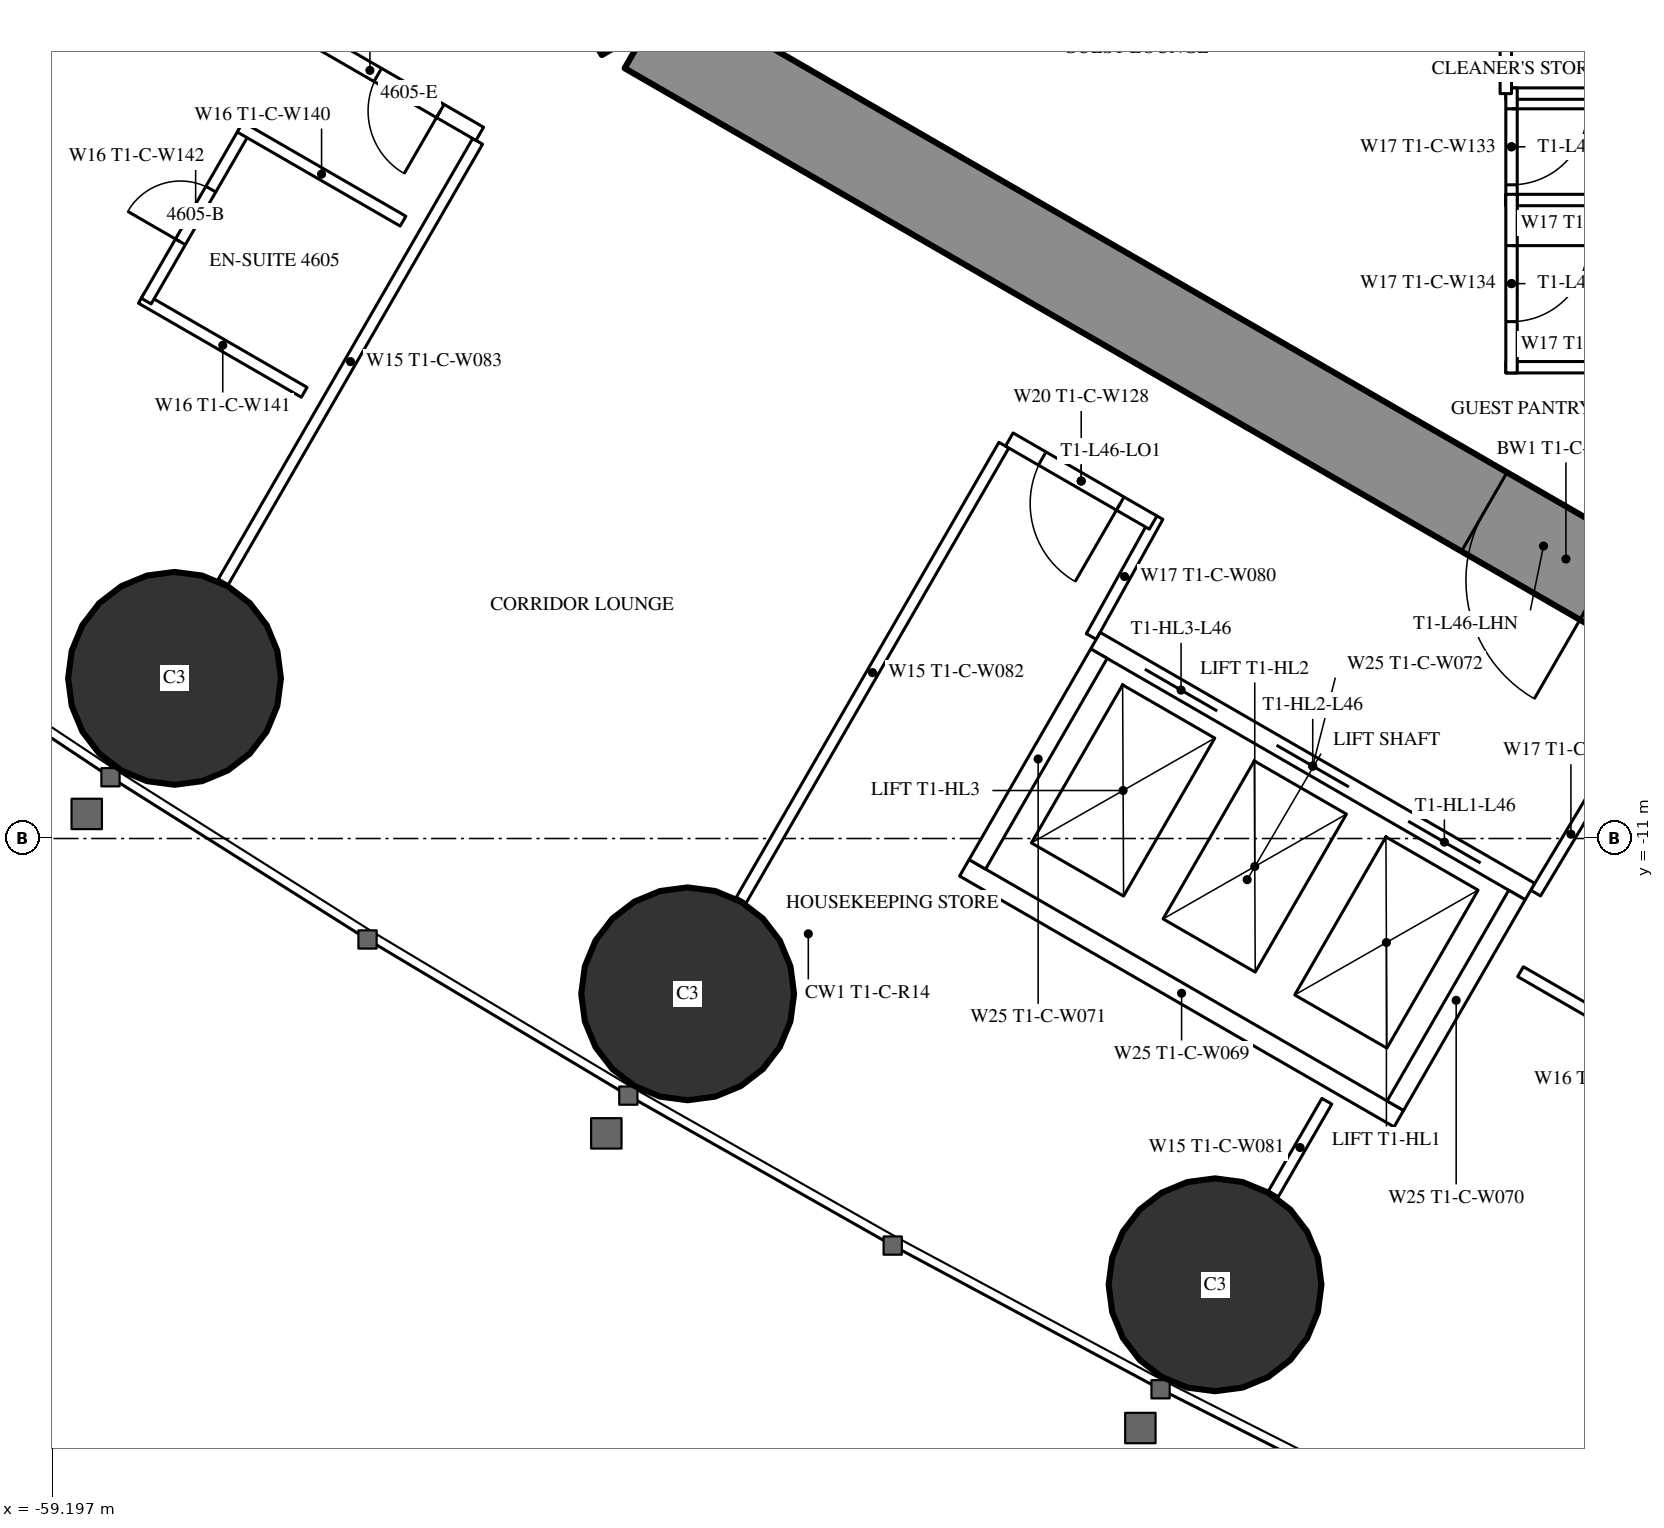
"""IFC4 building model, lengths in metres.
Left out: names, types, materials, properties, quantities, classifications, styles, units other than length and angle.
Written with IfcOpenShell. Run it as: python <this file> out.ifc"""

import sys

from ifc_helpers import new_model, si_unit, direction, frame, frame_2d, origin, origin_2d, place, context, subcontext, project, spatial, rectangle, circle, extrude, element, fill, save


model = new_model("IFC4")
c1 = context("Model", 3, precision=1e-05, world=origin(), true_north=direction((0.0, 1.0)))
c2 = subcontext(c1, "Body", "Model", "MODEL_VIEW")
j1 = project(units=[si_unit("LENGTHUNIT", "METRE"), si_unit("PLANEANGLEUNIT", "RADIAN")], contexts=[c1])
p1 = place(None, origin())
s1 = spatial("IfcSite", under=j1, at=p1, CompositionType="ELEMENT")
p2 = place(p1, origin())
s2 = spatial("IfcBuilding", under=s1, at=p2, CompositionType="ELEMENT")
p3 = place(p2, frame((0.0, 0.0, 173.8)))
s3 = spatial("IfcBuildingStorey", under=s2, at=p3, CompositionType="ELEMENT", Elevation=173.8)
for number, where, z_axis, x_axis in (
    (1, (-57.59, -8.893, 0.0), (0.0, 0.0, 1.0), (1.0, 0.0, 0.0)),
    (2, (-50.839, -13.043, 0.0), (0.0, 0.0, 1.0), (1.0, 0.0, 0.0)),
    (3, (-43.9, -16.871, 0.0), (0.0, 0.0, 1.0), (1.0, 0.0, 0.0)),
):
    element("IfcColumn", number, at=place(p3, frame(where, z_axis=z_axis, x_axis=x_axis)), inside=s3, PredefinedType="COLUMN", context=c2, shape_type="SweptSolid", body=[
        extrude(circle(Radius=1.4, at=origin_2d()), origin(), (0.0, 0.0, 1.0), 3.5),
    ])
p4 = place(p3, frame((-27.2, 14.3, 0.0), z_axis=(0.0, 0.0, 1.0), x_axis=(-0.866026593062, -0.499997940104, 0.0)))
e4 = element("IfcWall", 4, at=p4, inside=s3, PredefinedType="SHEAR", context=c2, shape_type="SweptSolid", body=[
    extrude(rectangle(XDim=28.946, YDim=1.2, at=frame_2d((14.473, 0.0))), origin(), (0.0, 0.0, 1.0), 3.5),
])
p5 = place(p4, frame((4.6, 0.0, 0.0)))
e5 = element("IfcOpeningElement", 5, at=p5, cuts=e4, PredefinedType="OPENING", context=c2, shape_type="SweptSolid", body=[
    extrude(rectangle(XDim=1.0, YDim=2.2, at=frame_2d((0.5, 1.1))), frame((0.0, 0.61, 0.0), z_axis=(0.0, -1.0, 0.0), x_axis=(1.0, 0.0, 0.0)), (0.0, 0.0, 1.0), 1.22),
])
p6 = place(p4, frame((13.395, 0.0, 0.0)))
e6 = element("IfcOpeningElement", 6, at=p6, cuts=e4, PredefinedType="OPENING", context=c2, shape_type="SweptSolid", body=[
    extrude(rectangle(XDim=1.8, YDim=2.2, at=frame_2d((0.9, 1.1))), frame((0.0, 0.61, 0.0), z_axis=(0.0, -1.0, 0.0), x_axis=(1.0, 0.0, 0.0)), (0.0, 0.0, 1.0), 1.22),
])
p7 = place(p3, frame((-27.2, -14.3, 0.0), z_axis=(0.0, 0.0, 1.0), x_axis=(-0.866024021859, 0.500002393557, 0.0)))
e7 = element("IfcWall", 7, at=p7, inside=s3, PredefinedType="SHEAR", context=c2, shape_type="SweptSolid", body=[
    extrude(rectangle(XDim=27.907, YDim=1.2, at=frame_2d((13.954, 0.0))), origin(), (0.0, 0.0, 1.0), 3.5),
])
p8 = place(p7, frame((4.6, 0.0, 0.0)))
e8 = element("IfcOpeningElement", 8, at=p8, cuts=e7, PredefinedType="OPENING", context=c2, shape_type="SweptSolid", body=[
    extrude(rectangle(XDim=1.0, YDim=2.2, at=frame_2d((0.5, 1.1))), frame((0.0, 0.61, 0.0), z_axis=(0.0, -1.0, 0.0), x_axis=(1.0, 0.0, 0.0)), (0.0, 0.0, 1.0), 1.22),
])
p9 = place(p7, frame((13.395, 0.0, 0.0)))
e9 = element("IfcOpeningElement", 9, at=p9, cuts=e7, PredefinedType="OPENING", context=c2, shape_type="SweptSolid", body=[
    extrude(rectangle(XDim=1.8, YDim=2.2, at=frame_2d((0.9, 1.1))), frame((0.0, 0.61, 0.0), z_axis=(0.0, -1.0, 0.0), x_axis=(1.0, 0.0, 0.0)), (0.0, 0.0, 1.0), 1.22),
])
p10 = place(p3, frame((-46.679, -5.825, 0.0), z_axis=(0.0, 0.0, 1.0), x_axis=(-0.500006839597, -0.866021454905, 0.0)))
e10 = element("IfcWall", 10, at=p10, inside=s3, PredefinedType="PARTITIONING", context=c2, shape_type="SweptSolid", body=[
    extrude(rectangle(XDim=6.911, YDim=0.15, at=frame_2d((3.456, 0.0))), origin(), (0.0, 0.0, 1.0), 2.3),
])
p11 = place(p3, frame((-53.602, -1.828, 0.0), z_axis=(0.0, 0.0, 1.0), x_axis=(-0.49999191814, -0.866030069798, 0.0)))
e11 = element("IfcWall", 11, at=p11, inside=s3, PredefinedType="PARTITIONING", context=c2, shape_type="SweptSolid", body=[
    extrude(rectangle(XDim=6.692, YDim=0.15, at=frame_2d((3.346, 0.0))), origin(), (0.0, 0.0, 1.0), 2.3),
])
p12 = place(p3, frame((-42.429, -14.457, 0.0), z_axis=(0.0, 0.0, 1.0), x_axis=(-0.5000578829, -0.865991982497, 0.0)))
e12 = element("IfcWall", 12, at=p12, inside=s3, PredefinedType="PARTITIONING", context=c2, shape_type="SweptSolid", body=[
    extrude(rectangle(XDim=1.407, YDim=0.15, at=frame_2d((0.704, 0.0))), origin(), (0.0, 0.0, 1.0), 3.25),
])
for number, where, z_axis, x_axis in (
    (13, (-39.683, -11.718, 0.0), (0.0, 0.0, 1.0), (0.514, 0.858, 0.0)),
    (14, (-44.652, -6.764, 0.0), (0.0, 0.0, 1.0), (-0.485, -0.874, 0.0)),
):
    element("IfcWall", number, at=place(p3, frame(where, z_axis=z_axis, x_axis=x_axis)), inside=s3, PredefinedType="PARTITIONING", context=c2, shape_type="SweptSolid", body=[
        extrude(rectangle(XDim=1.805, YDim=0.15, at=frame_2d((0.903, 0.0))), origin(), (0.0, 0.0, 1.0), 3.25),
    ])
p13 = place(p3, frame((-44.715, -6.844, 0.0), z_axis=(0.0, 0.0, 1.0), x_axis=(-0.865999496279, 0.500044870432, 0.0)))
e15 = element("IfcWall", 15, at=p13, inside=s3, PredefinedType="PARTITIONING", context=c2, shape_type="SweptSolid", body=[
    extrude(rectangle(XDim=2.185, YDim=0.2, at=frame_2d((1.092, 0.0))), origin(), (0.0, 0.0, 1.0), 3.25),
])
p14 = place(p13, frame((0.5, 0.0, 0.0)))
e16 = element("IfcOpeningElement", 16, at=p14, cuts=e15, PredefinedType="OPENING", context=c2, shape_type="SweptSolid", body=[
    extrude(rectangle(XDim=1.185, YDim=2.2, at=frame_2d((0.593, 1.1))), frame((0.0, 0.11, 0.0), z_axis=(0.0, -1.0, 0.0), x_axis=(1.0, 0.0, 0.0)), (0.0, 0.0, 1.0), 0.22),
])
p15 = place(p3, frame((-53.574, -1.729, 0.0), z_axis=(0.0, 0.0, 1.0), x_axis=(-0.866019930389, 0.500009480079, 0.0)))
e17 = element("IfcWall", 17, at=p15, inside=s3, PredefinedType="PARTITIONING", context=c2, shape_type="SweptSolid", body=[
    extrude(rectangle(XDim=3.338, YDim=0.2, at=frame_2d((1.669, 0.0))), origin(), (0.0, 0.0, 1.0), 3.25),
])
p16 = place(p15, frame((0.6, 0.0, 0.0)))
e18 = element("IfcOpeningElement", 18, at=p16, cuts=e17, PredefinedType="OPENING", context=c2, shape_type="SweptSolid", body=[
    extrude(rectangle(XDim=0.95, YDim=2.2, at=frame_2d((0.475, 1.1))), frame((0.0, 0.11, 0.0), z_axis=(0.0, -1.0, 0.0), x_axis=(1.0, 0.0, 0.0)), (0.0, 0.0, 1.0), 0.22),
])
p17 = place(p3, frame((-55.884, -5.13, 0.0), z_axis=(0.0, 0.0, 1.0), x_axis=(-0.866006523861, 0.500032699561, 0.0)))
e19 = element("IfcWall", 19, at=p17, inside=s3, PredefinedType="PARTITIONING", context=c2, shape_type="SweptSolid", body=[
    extrude(rectangle(XDim=2.475, YDim=0.15, at=frame_2d((1.237, 0.0))), origin(), (0.0, 0.0, 1.0), 3.25),
])
p18 = place(p3, frame((-56.662, -1.678, 0.0), z_axis=(0.0, 0.0, 1.0), x_axis=(-0.500006934395, -0.866021400173, 0.0)))
e20 = element("IfcWall", 20, at=p18, inside=s3, PredefinedType="PARTITIONING", context=c2, shape_type="SweptSolid", body=[
    extrude(rectangle(XDim=2.6, YDim=0.15, at=frame_2d((1.3, 0.0))), origin(), (0.0, 0.0, 1.0), 3.25),
])
p19 = place(p18, frame((0.9, 0.0, 0.0)))
e21 = element("IfcOpeningElement", 21, at=p19, cuts=e20, PredefinedType="OPENING", context=c2, shape_type="SweptSolid", body=[
    extrude(rectangle(XDim=0.8, YDim=2.2, at=frame_2d((0.4, 1.1))), frame((0.0, 0.085, 0.0), z_axis=(0.0, -1.0, 0.0), x_axis=(1.0, 0.0, 0.0)), (0.0, 0.0, 1.0), 0.17),
])
for number, where, z_axis, x_axis in (
    (22, (-54.583, -2.878, 0.0), (0.0, 0.0, 1.0), (-0.866, 0.5, 0.0)),
    (23, (-37.738, -13.989, 0.0), (0.0, 0.0, 1.0), (-0.866, 0.5, 0.0)),
):
    element("IfcWall", number, at=place(p3, frame(where, z_axis=z_axis, x_axis=x_axis)), inside=s3, PredefinedType="PARTITIONING", context=c2, shape_type="SweptSolid", body=[
        extrude(rectangle(XDim=2.475, YDim=0.15, at=frame_2d((1.237, 0.0))), origin(), (0.0, 0.0, 1.0), 3.25),
    ])
for number, where, z_axis, x_axis in (
    (24, (-37.9, -1.2, 0.0), (0.0, 0.0, 1.0), (-1.0, 0.0, 0.0)),
    (25, (-37.9, -2.6, 0.0), (0.0, 0.0, 1.0), (-1.0, 0.0, 0.0)),
    (26, (-37.9, -4.8, 0.0), (0.0, 0.0, 1.0), (-1.0, 0.0, 0.0)),
):
    element("IfcWall", number, at=place(p3, frame(where, z_axis=z_axis, x_axis=x_axis)), inside=s3, PredefinedType="PARTITIONING", context=c2, shape_type="SweptSolid", body=[
        extrude(rectangle(XDim=2.175, YDim=0.15, at=frame_2d((1.087, 0.0))), origin(), (0.0, 0.0, 1.0), 3.25),
    ])
p20 = place(p3, frame((-40.0, -1.125, 0.0), z_axis=(0.0, 0.0, 1.0), x_axis=(0.0, -1.0, 0.0)))
e27 = element("IfcWall", 27, at=p20, inside=s3, PredefinedType="PARTITIONING", context=c2, shape_type="SweptSolid", body=[
    extrude(rectangle(XDim=1.55, YDim=0.15, at=frame_2d((0.775, 0.0))), origin(), (0.0, 0.0, 1.0), 3.25),
])
p21 = place(p20, frame((0.275, 0.0, 0.0)))
e28 = element("IfcOpeningElement", 28, at=p21, cuts=e27, PredefinedType="OPENING", context=c2, shape_type="SweptSolid", body=[
    extrude(rectangle(XDim=1.0, YDim=2.2, at=frame_2d((0.5, 1.1))), frame((0.0, 0.085, 0.0), z_axis=(0.0, -1.0, 0.0), x_axis=(1.0, 0.0, 0.0)), (0.0, 0.0, 1.0), 0.17),
])
p22 = place(p3, frame((-40.0, -2.525, 0.0), z_axis=(0.0, 0.0, 1.0), x_axis=(0.0, -1.0, 0.0)))
e29 = element("IfcWall", 29, at=p22, inside=s3, PredefinedType="PARTITIONING", context=c2, shape_type="SweptSolid", body=[
    extrude(rectangle(XDim=2.35, YDim=0.15, at=frame_2d((1.175, 0.0))), origin(), (0.0, 0.0, 1.0), 3.25),
])
p23 = place(p22, frame((0.675, 0.0, 0.0)))
e30 = element("IfcOpeningElement", 30, at=p23, cuts=e29, PredefinedType="OPENING", context=c2, shape_type="SweptSolid", body=[
    extrude(rectangle(XDim=1.0, YDim=2.2, at=frame_2d((0.5, 1.1))), frame((0.0, 0.085, 0.0), z_axis=(0.0, -1.0, 0.0), x_axis=(1.0, 0.0, 0.0)), (0.0, 0.0, 1.0), 0.17),
])
p24 = place(p3, frame((-40.075, 6.174, 0.0), z_axis=(0.0, 0.0, 1.0), x_axis=(0.0, -1.0, 0.0)))
e31 = element("IfcWall", 31, at=p24, inside=s3, PredefinedType="PARTITIONING", context=c2, shape_type="SweptSolid", body=[
    extrude(rectangle(XDim=7.374, YDim=0.15, at=frame_2d((3.687, 0.0))), origin(), (0.0, 0.0, 1.0), 3.25),
])
p25 = place(p24, frame((2.787, 0.0, 0.0)))
e32 = element("IfcOpeningElement", 32, at=p25, cuts=e31, PredefinedType="OPENING", context=c2, shape_type="SweptSolid", body=[
    extrude(rectangle(XDim=1.8, YDim=2.2, at=frame_2d((0.9, 1.1))), frame((0.0, 0.085, 0.0), z_axis=(0.0, -1.0, 0.0), x_axis=(1.0, 0.0, 0.0)), (0.0, 0.0, 1.0), 0.17),
])
p26 = place(p3, frame((-39.758, -11.697, 0.0), z_axis=(0.0, 0.0, 1.0), x_axis=(-0.866024194504, 0.500002094529, 0.0)))
e33 = element("IfcWall", 33, at=p26, inside=s3, PredefinedType="PARTITIONING", context=c2, shape_type="SweptSolid", body=[
    extrude(rectangle(XDim=6.6, YDim=0.25, at=frame_2d((3.3, 0.0))), origin(), (0.0, 0.0, 1.0), 3.25),
])
p27 = place(p26, frame((0.75, 0.0, 0.0)))
e34 = element("IfcOpeningElement", 34, at=p27, cuts=e33, PredefinedType="OPENING", context=c2, shape_type="SweptSolid", body=[
    extrude(rectangle(XDim=1.1, YDim=2.2, at=frame_2d((0.55, 1.1))), frame((0.0, 0.135, 0.0), z_axis=(0.0, -1.0, 0.0), x_axis=(1.0, 0.0, 0.0)), (0.0, 0.0, 1.0), 0.27),
])
p28 = place(p26, frame((2.75, 0.0, 0.0)))
e35 = element("IfcOpeningElement", 35, at=p28, cuts=e33, PredefinedType="OPENING", context=c2, shape_type="SweptSolid", body=[
    extrude(rectangle(XDim=1.1, YDim=2.2, at=frame_2d((0.55, 1.1))), frame((0.0, 0.135, 0.0), z_axis=(0.0, -1.0, 0.0), x_axis=(1.0, 0.0, 0.0)), (0.0, 0.0, 1.0), 0.27),
])
p29 = place(p26, frame((4.75, 0.0, 0.0)))
e36 = element("IfcOpeningElement", 36, at=p29, cuts=e33, PredefinedType="OPENING", context=c2, shape_type="SweptSolid", body=[
    extrude(rectangle(XDim=1.1, YDim=2.2, at=frame_2d((0.55, 1.1))), frame((0.0, 0.135, 0.0), z_axis=(0.0, -1.0, 0.0), x_axis=(1.0, 0.0, 0.0)), (0.0, 0.0, 1.0), 0.27),
])
p30 = place(p3, frame((-41.482, -14.686, 0.0), z_axis=(0.0, 0.0, 1.0), x_axis=(-0.86603344179, 0.499986077507, 0.0)))
e37 = element("IfcWall", 37, at=p30, inside=s3, PredefinedType="PARTITIONING", context=c2, shape_type="SweptSolid", body=[
    extrude(rectangle(XDim=6.6, YDim=0.25, at=frame_2d((3.3, 0.0))), origin(), (0.0, 0.0, 1.0), 3.25),
])
for number, where, z_axis, x_axis in (
    (38, (-39.928, -11.743, 0.0), (0.0, 0.0, 1.0), (-0.5, -0.866, 0.0)),
    (39, (-45.428, -8.568, 0.0), (0.0, 0.0, 1.0), (-0.5, -0.866, 0.0)),
):
    element("IfcWall", number, at=place(p3, frame(where, z_axis=z_axis, x_axis=x_axis)), inside=s3, PredefinedType="PARTITIONING", context=c2, shape_type="SweptSolid", body=[
        extrude(rectangle(XDim=3.201, YDim=0.25, at=frame_2d((1.6, 0.0))), origin(), (0.0, 0.0, 1.0), 3.25),
    ])
p31 = place(p19, origin())
e40 = element("IfcDoor", 40, at=p31, inside=s3, OperationType="SINGLE_SWING_RIGHT", PredefinedType="DOOR", context=c2, shape_type="SweptSolid", body=[
    extrude(rectangle(XDim=0.8, YDim=2.2, at=frame_2d((0.4, 1.1))), frame((0.0, 0.025, 0.0), z_axis=(0.0, -1.0, 0.0), x_axis=(1.0, 0.0, 0.0)), (0.0, 0.0, 1.0), 0.05),
])
fill(e21, e40)
p32 = place(p16, origin())
e41 = element("IfcDoor", 41, at=p32, inside=s3, OperationType="SINGLE_SWING_LEFT", PredefinedType="DOOR", context=c2, shape_type="SweptSolid", body=[
    extrude(rectangle(XDim=0.95, YDim=2.2, at=frame_2d((0.475, 1.1))), frame((0.0, 0.025, 0.0), z_axis=(0.0, -1.0, 0.0), x_axis=(1.0, 0.0, 0.0)), (0.0, 0.0, 1.0), 0.05),
])
fill(e18, e41)
p33 = place(p14, origin())
e42 = element("IfcDoor", 42, at=p33, inside=s3, OperationType="SINGLE_SWING_LEFT", PredefinedType="DOOR", context=c2, shape_type="SweptSolid", body=[
    extrude(rectangle(XDim=1.185, YDim=2.2, at=frame_2d((0.593, 1.1))), frame((0.0, 0.025, 0.0), z_axis=(0.0, -1.0, 0.0), x_axis=(1.0, 0.0, 0.0)), (0.0, 0.0, 1.0), 0.05),
])
fill(e16, e42)
p34 = place(p21, origin())
e43 = element("IfcDoor", 43, at=p34, inside=s3, OperationType="SINGLE_SWING_LEFT", PredefinedType="DOOR", context=c2, shape_type="SweptSolid", body=[
    extrude(rectangle(XDim=1.0, YDim=2.2, at=frame_2d((0.5, 1.1))), frame((0.0, 0.025, 0.0), z_axis=(0.0, -1.0, 0.0), x_axis=(1.0, 0.0, 0.0)), (0.0, 0.0, 1.0), 0.05),
])
fill(e28, e43)
p35 = place(p23, origin())
e44 = element("IfcDoor", 44, at=p35, inside=s3, OperationType="SINGLE_SWING_LEFT", PredefinedType="DOOR", context=c2, shape_type="SweptSolid", body=[
    extrude(rectangle(XDim=1.0, YDim=2.2, at=frame_2d((0.5, 1.1))), frame((0.0, 0.025, 0.0), z_axis=(0.0, -1.0, 0.0), x_axis=(1.0, 0.0, 0.0)), (0.0, 0.0, 1.0), 0.05),
])
fill(e30, e44)
p36 = place(p9, origin())
e45 = element("IfcDoor", 45, at=p36, inside=s3, OperationType="DOUBLE_DOOR_SINGLE_SWING", PredefinedType="DOOR", context=c2, shape_type="SweptSolid", body=[
    extrude(rectangle(XDim=1.8, YDim=2.2, at=frame_2d((0.9, 1.1))), frame((0.0, 0.025, 0.0), z_axis=(0.0, -1.0, 0.0), x_axis=(1.0, 0.0, 0.0)), (0.0, 0.0, 1.0), 0.05),
])
fill(e9, e45)
p37 = place(p27, origin())
e46 = element("IfcDoor", 46, at=p37, inside=s3, OperationType="DOUBLE_DOOR_SLIDING", PredefinedType="USERDEFINED", context=c2, shape_type="SweptSolid", body=[
    extrude(rectangle(XDim=1.1, YDim=2.2, at=frame_2d((0.55, 1.1))), frame((0.0, 0.025, 0.0), z_axis=(0.0, -1.0, 0.0), x_axis=(1.0, 0.0, 0.0)), (0.0, 0.0, 1.0), 0.05),
])
fill(e34, e46)
p38 = place(p28, origin())
e47 = element("IfcDoor", 47, at=p38, inside=s3, OperationType="DOUBLE_DOOR_SLIDING", PredefinedType="USERDEFINED", context=c2, shape_type="SweptSolid", body=[
    extrude(rectangle(XDim=1.1, YDim=2.2, at=frame_2d((0.55, 1.1))), frame((0.0, 0.025, 0.0), z_axis=(0.0, -1.0, 0.0), x_axis=(1.0, 0.0, 0.0)), (0.0, 0.0, 1.0), 0.05),
])
fill(e35, e47)
p39 = place(p29, origin())
e48 = element("IfcDoor", 48, at=p39, inside=s3, OperationType="DOUBLE_DOOR_SLIDING", PredefinedType="USERDEFINED", context=c2, shape_type="SweptSolid", body=[
    extrude(rectangle(XDim=1.1, YDim=2.2, at=frame_2d((0.55, 1.1))), frame((0.0, 0.025, 0.0), z_axis=(0.0, -1.0, 0.0), x_axis=(1.0, 0.0, 0.0)), (0.0, 0.0, 1.0), 0.05),
])
fill(e36, e48)
save(model, sys.argv[1])
